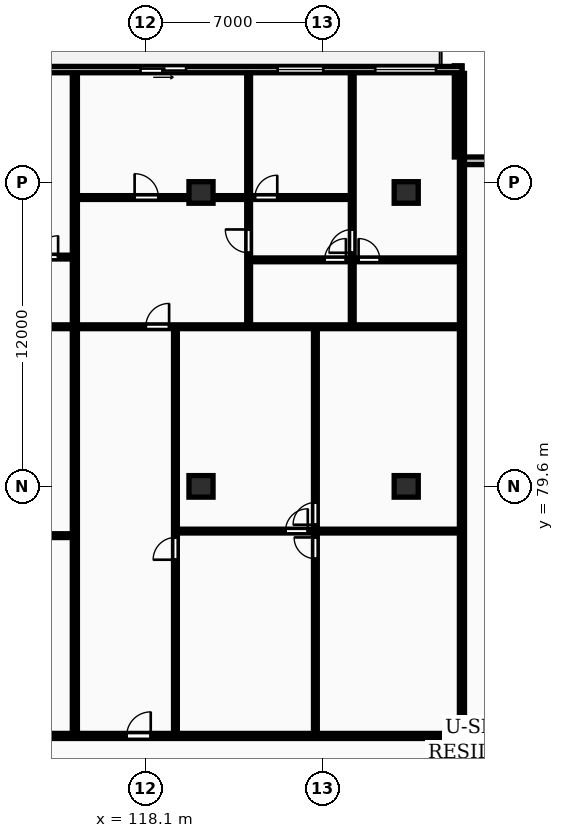
"""IFC4 building model, lengths in metres.
Left out: names, types, materials, properties, quantities, classifications, styles, units other than length and angle.
Written with IfcOpenShell. Run it as: python <this file> out.ifc"""

import sys

from ifc_helpers import new_model, si_unit, direction, frame, frame_2d, origin, origin_2d, place, context, subcontext, project, spatial, rectangle, extrude, element, fill, save


model = new_model("IFC4")
c1 = context("Model", 3, precision=1e-05, world=origin(), true_north=direction((0.0, 1.0)))
c2 = subcontext(c1, "Body", "Model", "MODEL_VIEW")
j1 = project(units=[si_unit("LENGTHUNIT", "METRE"), si_unit("PLANEANGLEUNIT", "RADIAN")], contexts=[c1])
p1 = place(None, origin())
s1 = spatial("IfcSite", under=j1, at=p1, CompositionType="ELEMENT")
p2 = place(p1, origin())
s2 = spatial("IfcBuilding", under=s1, at=p2, CompositionType="ELEMENT")
p3 = place(p2, frame((0.0, 0.0, 119.8)))
s3 = spatial("IfcBuildingStorey", under=s2, at=p3, CompositionType="ELEMENT", Elevation=119.8)
for number, where, z_axis, x_axis in (
    (1, (120.3, 79.6, 0.0), (0.0, 0.0, 1.0), (1.0, 0.0, 0.0)),
    (2, (120.3, 91.2, 0.0), (0.0, 0.0, 1.0), (1.0, 0.0, 0.0)),
    (3, (128.4, 79.6, 0.0), (0.0, 0.0, 1.0), (1.0, 0.0, 0.0)),
    (4, (128.4, 91.2, 0.0), (0.0, 0.0, 1.0), (1.0, 0.0, 0.0)),
):
    element("IfcColumn", number, at=place(p3, frame(where, z_axis=z_axis, x_axis=x_axis)), inside=s3, PredefinedType="COLUMN", context=c2, shape_type="SweptSolid", body=[
        extrude(rectangle(XDim=0.95, YDim=0.85, at=origin_2d()), origin(), (0.0, 0.0, 1.0), 3.25),
    ])
for number, where, z_axis, x_axis in (
    (5, (134.2, 92.45, 0.0), (0.0, 0.0, 1.0), (-1.0, 0.0, 0.0)),
    (6, (130.45, 92.6, 0.0), (0.0, 0.0, 1.0), (0.0, 1.0, 0.0)),
):
    element("IfcWall", number, at=place(p3, frame(where, z_axis=z_axis, x_axis=x_axis)), inside=s3, PredefinedType="STANDARD", context=c2, shape_type="SweptSolid", body=[
        extrude(rectangle(XDim=3.6, YDim=0.3, at=frame_2d((1.8, 0.0))), origin(), (0.0, 0.0, 1.0), 2.97),
    ])
p4 = place(p3, frame((130.6, 96.05, 0.0), z_axis=(0.0, 0.0, 1.0), x_axis=(-1.0, 0.0, 0.0)))
e7 = element("IfcWall", 7, at=p4, inside=s3, PredefinedType="STANDARD", context=c2, shape_type="SweptSolid", body=[
    extrude(rectangle(XDim=73.0, YDim=0.25, at=frame_2d((36.5, 0.0))), origin(), (0.0, 0.0, 1.0), 2.97),
])
p5 = place(p4, frame((67.772, 0.0, 0.0)))
e8 = element("IfcOpeningElement", 8, at=p5, cuts=e7, PredefinedType="OPENING", context=c2, shape_type="SweptSolid", body=[
    extrude(rectangle(XDim=1.8, YDim=2.2, at=frame_2d((0.9, 1.1))), frame((0.0, 0.135, 0.0), z_axis=(0.0, -1.0, 0.0), x_axis=(1.0, 0.0, 0.0)), (0.0, 0.0, 1.0), 0.27),
])
p6 = place(p4, frame((57.637, 0.0, 0.85)))
e9 = element("IfcOpeningElement", 9, at=p6, cuts=e7, PredefinedType="OPENING", context=c2, shape_type="SweptSolid", body=[
    extrude(rectangle(XDim=2.4, YDim=1.9, at=frame_2d((1.2, 0.95))), frame((0.0, 0.135, 0.0), z_axis=(0.0, -1.0, 0.0), x_axis=(1.0, 0.0, 0.0)), (0.0, 0.0, 1.0), 0.27),
])
p7 = place(p4, frame((47.827, 0.0, 0.0)))
e10 = element("IfcOpeningElement", 10, at=p7, cuts=e7, PredefinedType="OPENING", context=c2, shape_type="SweptSolid", body=[
    extrude(rectangle(XDim=1.8, YDim=2.2, at=frame_2d((0.9, 1.1))), frame((0.0, 0.135, 0.0), z_axis=(0.0, -1.0, 0.0), x_axis=(1.0, 0.0, 0.0)), (0.0, 0.0, 1.0), 0.27),
])
p8 = place(p4, frame((37.736, 0.0, 0.85)))
e11 = element("IfcOpeningElement", 11, at=p8, cuts=e7, PredefinedType="OPENING", context=c2, shape_type="SweptSolid", body=[
    extrude(rectangle(XDim=2.4, YDim=1.9, at=frame_2d((1.2, 0.95))), frame((0.0, 0.135, 0.0), z_axis=(0.0, -1.0, 0.0), x_axis=(1.0, 0.0, 0.0)), (0.0, 0.0, 1.0), 0.27),
])
p9 = place(p4, frame((21.9, 0.0, 0.85)))
e12 = element("IfcOpeningElement", 12, at=p9, cuts=e7, PredefinedType="OPENING", context=c2, shape_type="SweptSolid", body=[
    extrude(rectangle(XDim=2.4, YDim=1.9, at=frame_2d((1.2, 0.95))), frame((0.0, 0.135, 0.0), z_axis=(0.0, -1.0, 0.0), x_axis=(1.0, 0.0, 0.0)), (0.0, 0.0, 1.0), 0.27),
])
p10 = place(p4, frame((28.584, 0.0, 0.0)))
e13 = element("IfcOpeningElement", 13, at=p10, cuts=e7, PredefinedType="OPENING", context=c2, shape_type="SweptSolid", body=[
    extrude(rectangle(XDim=1.8, YDim=2.2, at=frame_2d((0.9, 1.1))), frame((0.0, 0.135, 0.0), z_axis=(0.0, -1.0, 0.0), x_axis=(1.0, 0.0, 0.0)), (0.0, 0.0, 1.0), 0.27),
])
p11 = place(p4, frame((16.689, 0.0, 0.85)))
e14 = element("IfcOpeningElement", 14, at=p11, cuts=e7, PredefinedType="OPENING", context=c2, shape_type="SweptSolid", body=[
    extrude(rectangle(XDim=2.4, YDim=1.9, at=frame_2d((1.2, 0.95))), frame((0.0, 0.135, 0.0), z_axis=(0.0, -1.0, 0.0), x_axis=(1.0, 0.0, 0.0)), (0.0, 0.0, 1.0), 0.27),
])
p12 = place(p4, frame((5.475, 0.0, 0.85)))
e15 = element("IfcOpeningElement", 15, at=p12, cuts=e7, PredefinedType="OPENING", context=c2, shape_type="SweptSolid", body=[
    extrude(rectangle(XDim=1.8, YDim=1.8, at=frame_2d((0.9, 0.9))), frame((0.0, 0.135, 0.0), z_axis=(0.0, -1.0, 0.0), x_axis=(1.0, 0.0, 0.0)), (0.0, 0.0, 1.0), 0.27),
])
p13 = place(p4, frame((10.889, 0.0, 0.0)))
e16 = element("IfcOpeningElement", 16, at=p13, cuts=e7, PredefinedType="OPENING", context=c2, shape_type="SweptSolid", body=[
    extrude(rectangle(XDim=1.8, YDim=2.2, at=frame_2d((0.9, 1.1))), frame((0.0, 0.135, 0.0), z_axis=(0.0, -1.0, 0.0), x_axis=(1.0, 0.0, 0.0)), (0.0, 0.0, 1.0), 0.27),
])
p14 = place(p4, frame((1.025, 0.0, 0.85)))
e17 = element("IfcOpeningElement", 17, at=p14, cuts=e7, PredefinedType="OPENING", context=c2, shape_type="SweptSolid", body=[
    extrude(rectangle(XDim=2.4, YDim=1.9, at=frame_2d((1.2, 0.95))), frame((0.0, 0.135, 0.0), z_axis=(0.0, -1.0, 0.0), x_axis=(1.0, 0.0, 0.0)), (0.0, 0.0, 1.0), 0.27),
])
for number, where, z_axis, x_axis in (
    (18, (130.6, 69.83, 0.0), (0.0, 0.0, 1.0), (0.0, 1.0, 0.0)),
    (19, (115.321, 69.83, 0.0), (0.0, 0.0, 1.0), (0.0, 1.0, 0.0)),
):
    element("IfcWall", number, at=place(p3, frame(where, z_axis=z_axis, x_axis=x_axis)), inside=s3, PredefinedType="PARTITIONING", context=c2, shape_type="SweptSolid", body=[
        extrude(rectangle(XDim=26.07, YDim=0.2, at=frame_2d((13.035, 0.0))), origin(), (0.0, 0.0, 1.0), 2.97),
    ])
p15 = place(p3, frame((101.362, 77.655, 0.0), z_axis=(0.0, 0.0, 1.0), x_axis=(1.0, 0.0, 0.0)))
e20 = element("IfcWall", 20, at=p15, inside=s3, PredefinedType="PARTITIONING", context=c2, shape_type="SweptSolid", body=[
    extrude(rectangle(XDim=13.88, YDim=0.15, at=frame_2d((6.94, 0.0))), origin(), (0.0, 0.0, 1.0), 2.97),
])
p16 = place(p15, frame((5.94, 0.0, 0.0)))
e21 = element("IfcOpeningElement", 21, at=p16, cuts=e20, PredefinedType="OPENING", context=c2, shape_type="SweptSolid", body=[
    extrude(rectangle(XDim=0.88, YDim=2.06, at=frame_2d((0.44, 1.03))), frame((0.0, 0.085, 0.0), z_axis=(0.0, -1.0, 0.0), x_axis=(1.0, 0.0, 0.0)), (0.0, 0.0, 1.0), 0.17),
])
p17 = place(p3, frame((104.82, 88.65, 0.0), z_axis=(0.0, 0.0, 1.0), x_axis=(1.0, 0.0, 0.0)))
e22 = element("IfcWall", 22, at=p17, inside=s3, PredefinedType="PARTITIONING", context=c2, shape_type="SweptSolid", body=[
    extrude(rectangle(XDim=10.421, YDim=0.15, at=frame_2d((5.21, 0.0))), origin(), (0.0, 0.0, 1.0), 2.97),
])
p18 = place(p17, frame((4.31, 0.0, 0.0)))
e23 = element("IfcOpeningElement", 23, at=p18, cuts=e22, PredefinedType="OPENING", context=c2, shape_type="SweptSolid", body=[
    extrude(rectangle(XDim=0.84, YDim=2.04, at=frame_2d((0.42, 1.02))), frame((0.0, 0.085, 0.0), z_axis=(0.0, -1.0, 0.0), x_axis=(1.0, 0.0, 0.0)), (0.0, 0.0, 1.0), 0.17),
])
p19 = place(p17, frame((9.0, 0.0, 0.0)))
e24 = element("IfcOpeningElement", 24, at=p19, cuts=e22, PredefinedType="OPENING", context=c2, shape_type="SweptSolid", body=[
    extrude(rectangle(XDim=0.84, YDim=2.04, at=frame_2d((0.42, 1.02))), frame((0.0, 0.085, 0.0), z_axis=(0.0, -1.0, 0.0), x_axis=(1.0, 0.0, 0.0)), (0.0, 0.0, 1.0), 0.17),
])
p20 = place(p3, frame((97.412, 85.9, 0.0), z_axis=(0.0, 0.0, 1.0), x_axis=(1.0, 0.0, 0.0)))
e25 = element("IfcWall", 25, at=p20, inside=s3, PredefinedType="PARTITIONING", context=c2, shape_type="SweptSolid", body=[
    extrude(rectangle(XDim=17.83, YDim=0.15, at=frame_2d((8.915, 0.0))), origin(), (0.0, 0.0, 1.0), 2.97),
])
p21 = place(p20, frame((2.72, 0.0, 0.0)))
e26 = element("IfcOpeningElement", 26, at=p21, cuts=e25, PredefinedType="OPENING", context=c2, shape_type="SweptSolid", body=[
    extrude(rectangle(XDim=0.92, YDim=2.08, at=frame_2d((0.46, 1.04))), frame((0.0, 0.085, 0.0), z_axis=(0.0, -1.0, 0.0), x_axis=(1.0, 0.0, 0.0)), (0.0, 0.0, 1.0), 0.17),
])
p22 = place(p3, frame((124.815, 69.81, 0.0), z_axis=(0.0, 0.0, 1.0), x_axis=(0.0, 1.0, 0.0)))
e27 = element("IfcWall", 27, at=p22, inside=s3, PredefinedType="PARTITIONING", context=c2, shape_type="SweptSolid", body=[
    extrude(rectangle(XDim=16.05, YDim=0.15, at=frame_2d((8.025, 0.0))), origin(), (0.0, 0.0, 1.0), 2.97),
])
p23 = place(p22, frame((6.935, 0.0, 0.0)))
e28 = element("IfcOpeningElement", 28, at=p23, cuts=e27, PredefinedType="OPENING", context=c2, shape_type="SweptSolid", body=[
    extrude(rectangle(XDim=0.84, YDim=2.04, at=frame_2d((0.42, 1.02))), frame((0.0, 0.085, 0.0), z_axis=(0.0, -1.0, 0.0), x_axis=(1.0, 0.0, 0.0)), (0.0, 0.0, 1.0), 0.17),
])
p24 = place(p22, frame((8.275, 0.0, 0.0)))
e29 = element("IfcOpeningElement", 29, at=p24, cuts=e27, PredefinedType="OPENING", context=c2, shape_type="SweptSolid", body=[
    extrude(rectangle(XDim=0.88, YDim=2.06, at=frame_2d((0.44, 1.03))), frame((0.0, 0.085, 0.0), z_axis=(0.0, -1.0, 0.0), x_axis=(1.0, 0.0, 0.0)), (0.0, 0.0, 1.0), 0.17),
])
p25 = place(p3, frame((119.351, 77.835, 0.0), z_axis=(0.0, 0.0, 1.0), x_axis=(1.0, 0.0, 0.0)))
e30 = element("IfcWall", 30, at=p25, inside=s3, PredefinedType="PARTITIONING", context=c2, shape_type="SweptSolid", body=[
    extrude(rectangle(XDim=11.169, YDim=0.15, at=frame_2d((5.584, 0.0))), origin(), (0.0, 0.0, 1.0), 2.97),
])
p26 = place(p25, frame((4.284, 0.0, 0.0)))
e31 = element("IfcOpeningElement", 31, at=p26, cuts=e30, PredefinedType="OPENING", context=c2, shape_type="SweptSolid", body=[
    extrude(rectangle(XDim=0.88, YDim=2.06, at=frame_2d((0.44, 1.03))), frame((0.0, 0.085, 0.0), z_axis=(0.0, -1.0, 0.0), x_axis=(1.0, 0.0, 0.0)), (0.0, 0.0, 1.0), 0.17),
])
p27 = place(p3, frame((119.291, 69.81, 0.0), z_axis=(0.0, 0.0, 1.0), x_axis=(0.0, 1.0, 0.0)))
e32 = element("IfcWall", 32, at=p27, inside=s3, PredefinedType="PARTITIONING", context=c2, shape_type="SweptSolid", body=[
    extrude(rectangle(XDim=16.05, YDim=0.15, at=frame_2d((8.025, 0.0))), origin(), (0.0, 0.0, 1.0), 2.97),
])
p28 = place(p27, frame((6.895, 0.0, 0.0)))
e33 = element("IfcOpeningElement", 33, at=p28, cuts=e32, PredefinedType="OPENING", context=c2, shape_type="SweptSolid", body=[
    extrude(rectangle(XDim=0.88, YDim=2.06, at=frame_2d((0.44, 1.03))), frame((0.0, 0.085, 0.0), z_axis=(0.0, -1.0, 0.0), x_axis=(1.0, 0.0, 0.0)), (0.0, 0.0, 1.0), 0.17),
])
p29 = place(p3, frame((122.18, 85.94, 0.0), z_axis=(0.0, 0.0, 1.0), x_axis=(0.0, 1.0, 0.0)))
e34 = element("IfcWall", 34, at=p29, inside=s3, PredefinedType="PARTITIONING", context=c2, shape_type="SweptSolid", body=[
    extrude(rectangle(XDim=9.96, YDim=0.15, at=frame_2d((4.98, 0.0))), origin(), (0.0, 0.0, 1.0), 2.97),
])
p30 = place(p29, frame((2.88, 0.0, 0.0)))
e35 = element("IfcOpeningElement", 35, at=p30, cuts=e34, PredefinedType="OPENING", context=c2, shape_type="SweptSolid", body=[
    extrude(rectangle(XDim=0.92, YDim=2.08, at=frame_2d((0.46, 1.04))), frame((0.0, 0.085, 0.0), z_axis=(0.0, -1.0, 0.0), x_axis=(1.0, 0.0, 0.0)), (0.0, 0.0, 1.0), 0.17),
])
p31 = place(p3, frame((126.27, 85.94, 0.0), z_axis=(0.0, 0.0, 1.0), x_axis=(0.0, 1.0, 0.0)))
e36 = element("IfcWall", 36, at=p31, inside=s3, PredefinedType="PARTITIONING", context=c2, shape_type="SweptSolid", body=[
    extrude(rectangle(XDim=2.58, YDim=0.15, at=frame_2d((1.29, 0.0))), origin(), (0.0, 0.0, 1.0), 2.97),
])
p32 = place(p3, frame((126.27, 88.56, 0.0), z_axis=(0.0, 0.0, 1.0), x_axis=(0.0, 1.0, 0.0)))
e37 = element("IfcWall", 37, at=p32, inside=s3, PredefinedType="PARTITIONING", context=c2, shape_type="SweptSolid", body=[
    extrude(rectangle(XDim=7.34, YDim=0.15, at=frame_2d((3.67, 0.0))), origin(), (0.0, 0.0, 1.0), 2.97),
])
p33 = place(p32, frame((0.26, 0.0, 0.0)))
e38 = element("IfcOpeningElement", 38, at=p33, cuts=e37, PredefinedType="OPENING", context=c2, shape_type="SweptSolid", body=[
    extrude(rectangle(XDim=0.92, YDim=2.08, at=frame_2d((0.46, 1.04))), frame((0.0, 0.085, 0.0), z_axis=(0.0, -1.0, 0.0), x_axis=(1.0, 0.0, 0.0)), (0.0, 0.0, 1.0), 0.17),
])
p34 = place(p3, frame((122.22, 88.54, 0.0), z_axis=(0.0, 0.0, 1.0), x_axis=(1.0, 0.0, 0.0)))
e39 = element("IfcWall", 39, at=p34, inside=s3, PredefinedType="PARTITIONING", context=c2, shape_type="SweptSolid", body=[
    extrude(rectangle(XDim=8.3, YDim=0.15, at=frame_2d((4.15, 0.0))), origin(), (0.0, 0.0, 1.0), 2.97),
])
p35 = place(p34, frame((2.96, 0.0, 0.0)))
e40 = element("IfcOpeningElement", 40, at=p35, cuts=e39, PredefinedType="OPENING", context=c2, shape_type="SweptSolid", body=[
    extrude(rectangle(XDim=0.84, YDim=2.04, at=frame_2d((0.42, 1.02))), frame((0.0, 0.085, 0.0), z_axis=(0.0, -1.0, 0.0), x_axis=(1.0, 0.0, 0.0)), (0.0, 0.0, 1.0), 0.17),
])
p36 = place(p34, frame((4.3, 0.0, 0.0)))
e41 = element("IfcOpeningElement", 41, at=p36, cuts=e39, PredefinedType="OPENING", context=c2, shape_type="SweptSolid", body=[
    extrude(rectangle(XDim=0.84, YDim=2.04, at=frame_2d((0.42, 1.02))), frame((0.0, 0.085, 0.0), z_axis=(0.0, -1.0, 0.0), x_axis=(1.0, 0.0, 0.0)), (0.0, 0.0, 1.0), 0.17),
])
p37 = place(p3, frame((115.401, 85.9, 0.0), z_axis=(0.0, 0.0, 1.0), x_axis=(1.0, 0.0, 0.0)))
e42 = element("IfcWall", 42, at=p37, inside=s3, PredefinedType="PARTITIONING", context=c2, shape_type="SweptSolid", body=[
    extrude(rectangle(XDim=15.119, YDim=0.15, at=frame_2d((7.56, 0.0))), origin(), (0.0, 0.0, 1.0), 2.97),
])
p38 = place(p37, frame((2.72, 0.0, 0.0)))
e43 = element("IfcOpeningElement", 43, at=p38, cuts=e42, PredefinedType="OPENING", context=c2, shape_type="SweptSolid", body=[
    extrude(rectangle(XDim=0.92, YDim=2.08, at=frame_2d((0.46, 1.04))), frame((0.0, 0.085, 0.0), z_axis=(0.0, -1.0, 0.0), x_axis=(1.0, 0.0, 0.0)), (0.0, 0.0, 1.0), 0.17),
])
p39 = place(p3, frame((115.401, 91.0, 0.0), z_axis=(0.0, 0.0, 1.0), x_axis=(1.0, 0.0, 0.0)))
e44 = element("IfcWall", 44, at=p39, inside=s3, PredefinedType="PARTITIONING", context=c2, shape_type="SweptSolid", body=[
    extrude(rectangle(XDim=10.869, YDim=0.15, at=frame_2d((5.435, 0.0))), origin(), (0.0, 0.0, 1.0), 2.663),
])
p40 = place(p39, frame((2.279, 0.0, 0.0)))
e45 = element("IfcOpeningElement", 45, at=p40, cuts=e44, PredefinedType="OPENING", context=c2, shape_type="SweptSolid", body=[
    extrude(rectangle(XDim=0.94, YDim=2.1, at=frame_2d((0.47, 1.05))), frame((0.0, 0.085, 0.0), z_axis=(0.0, -1.0, 0.0), x_axis=(1.0, 0.0, 0.0)), (0.0, 0.0, 1.0), 0.17),
])
p41 = place(p39, frame((7.029, 0.0, 0.0)))
e46 = element("IfcOpeningElement", 46, at=p41, cuts=e44, PredefinedType="OPENING", context=c2, shape_type="SweptSolid", body=[
    extrude(rectangle(XDim=0.88, YDim=2.06, at=frame_2d((0.44, 1.03))), frame((0.0, 0.085, 0.0), z_axis=(0.0, -1.0, 0.0), x_axis=(1.0, 0.0, 0.0)), (0.0, 0.0, 1.0), 0.17),
])
p42 = place(p3, frame((57.6, 69.75, 0.0), z_axis=(0.0, 0.0, 1.0), x_axis=(1.0, 0.0, 0.0)))
e47 = element("IfcWall", 47, at=p42, inside=s3, PredefinedType="PARTITIONING", context=c2, shape_type="SweptSolid", body=[
    extrude(rectangle(XDim=73.0, YDim=0.2, at=frame_2d((36.5, 0.0))), origin(), (0.0, 0.0, 1.0), 2.97),
])
p43 = place(p42, frame((7.364, 0.0, 0.0)))
e48 = element("IfcOpeningElement", 48, at=p43, cuts=e47, PredefinedType="OPENING", context=c2, shape_type="SweptSolid", body=[
    extrude(rectangle(XDim=1.22, YDim=2.18, at=frame_2d((0.61, 1.09))), frame((0.0, 0.11, 0.0), z_axis=(0.0, -1.0, 0.0), x_axis=(1.0, 0.0, 0.0)), (0.0, 0.0, 1.0), 0.22),
])
p44 = place(p42, frame((28.813, 0.0, 0.0)))
e49 = element("IfcOpeningElement", 49, at=p44, cuts=e47, PredefinedType="OPENING", context=c2, shape_type="SweptSolid", body=[
    extrude(rectangle(XDim=1.22, YDim=2.18, at=frame_2d((0.61, 1.09))), frame((0.0, 0.11, 0.0), z_axis=(0.0, -1.0, 0.0), x_axis=(1.0, 0.0, 0.0)), (0.0, 0.0, 1.0), 0.22),
])
p45 = place(p42, frame((41.777, 0.0, 0.0)))
e50 = element("IfcOpeningElement", 50, at=p45, cuts=e47, PredefinedType="OPENING", context=c2, shape_type="SweptSolid", body=[
    extrude(rectangle(XDim=0.95, YDim=2.15, at=frame_2d((0.475, 1.075))), frame((0.0, 0.11, 0.0), z_axis=(0.0, -1.0, 0.0), x_axis=(1.0, 0.0, 0.0)), (0.0, 0.0, 1.0), 0.22),
])
p46 = place(p42, frame((59.766, 0.0, 0.0)))
e51 = element("IfcOpeningElement", 51, at=p46, cuts=e47, PredefinedType="OPENING", context=c2, shape_type="SweptSolid", body=[
    extrude(rectangle(XDim=0.95, YDim=2.15, at=frame_2d((0.475, 1.075))), frame((0.0, 0.11, 0.0), z_axis=(0.0, -1.0, 0.0), x_axis=(1.0, 0.0, 0.0)), (0.0, 0.0, 1.0), 0.22),
])
p47 = place(p12, origin())
e52 = element("IfcWindow", 52, at=p47, inside=s3, PartitioningType="SINGLE_PANEL", PredefinedType="WINDOW", context=c2, shape_type="SweptSolid", body=[
    extrude(rectangle(XDim=1.8, YDim=1.8, at=frame_2d((0.9, 0.9))), frame((0.0, 0.03, 0.0), z_axis=(0.0, -1.0, 0.0), x_axis=(1.0, 0.0, 0.0)), (0.0, 0.0, 1.0), 0.06),
])
fill(e15, e52)
p48 = place(p13, origin())
e53 = element("IfcDoor", 53, at=p48, inside=s3, OperationType="SLIDING_TO_LEFT", PredefinedType="DOOR", context=c2, shape_type="SweptSolid", body=[
    extrude(rectangle(XDim=1.8, YDim=2.2, at=frame_2d((0.9, 1.1))), frame((0.0, 0.025, 0.0), z_axis=(0.0, -1.0, 0.0), x_axis=(1.0, 0.0, 0.0)), (0.0, 0.0, 1.0), 0.05),
])
fill(e16, e53)
p49 = place(p14, origin())
e54 = element("IfcWindow", 54, at=p49, inside=s3, PartitioningType="DOUBLE_PANEL_VERTICAL", PredefinedType="WINDOW", context=c2, shape_type="SweptSolid", body=[
    extrude(rectangle(XDim=2.4, YDim=1.9, at=frame_2d((1.2, 0.95))), frame((0.0, 0.03, 0.0), z_axis=(0.0, -1.0, 0.0), x_axis=(1.0, 0.0, 0.0)), (0.0, 0.0, 1.0), 0.06),
])
fill(e17, e54)
p50 = place(p19, origin())
e55 = element("IfcDoor", 55, at=p50, inside=s3, OperationType="SINGLE_SWING_RIGHT", PredefinedType="DOOR", context=c2, shape_type="SweptSolid", body=[
    extrude(rectangle(XDim=0.84, YDim=2.04, at=frame_2d((0.42, 1.02))), frame((0.0, 0.025, 0.0), z_axis=(0.0, -1.0, 0.0), x_axis=(1.0, 0.0, 0.0)), (0.0, 0.0, 1.0), 0.05),
])
fill(e24, e55)
p51 = place(p23, origin())
e56 = element("IfcDoor", 56, at=p51, inside=s3, OperationType="SINGLE_SWING_RIGHT", PredefinedType="DOOR", context=c2, shape_type="SweptSolid", body=[
    extrude(rectangle(XDim=0.84, YDim=2.04, at=frame_2d((0.42, 1.02))), frame((0.0, 0.025, 0.0), z_axis=(0.0, -1.0, 0.0), x_axis=(1.0, 0.0, 0.0)), (0.0, 0.0, 1.0), 0.05),
])
fill(e28, e56)
p52 = place(p24, origin())
e57 = element("IfcDoor", 57, at=p52, inside=s3, OperationType="SINGLE_SWING_LEFT", PredefinedType="DOOR", context=c2, shape_type="SweptSolid", body=[
    extrude(rectangle(XDim=0.88, YDim=2.06, at=frame_2d((0.44, 1.03))), frame((0.0, 0.025, 0.0), z_axis=(0.0, -1.0, 0.0), x_axis=(1.0, 0.0, 0.0)), (0.0, 0.0, 1.0), 0.05),
])
fill(e29, e57)
p53 = place(p26, origin())
e58 = element("IfcDoor", 58, at=p53, inside=s3, OperationType="SINGLE_SWING_RIGHT", PredefinedType="DOOR", context=c2, shape_type="SweptSolid", body=[
    extrude(rectangle(XDim=0.88, YDim=2.06, at=frame_2d((0.44, 1.03))), frame((0.0, 0.025, 0.0), z_axis=(0.0, -1.0, 0.0), x_axis=(1.0, 0.0, 0.0)), (0.0, 0.0, 1.0), 0.05),
])
fill(e31, e58)
p54 = place(p28, origin())
e59 = element("IfcDoor", 59, at=p54, inside=s3, OperationType="SINGLE_SWING_LEFT", PredefinedType="DOOR", context=c2, shape_type="SweptSolid", body=[
    extrude(rectangle(XDim=0.88, YDim=2.06, at=frame_2d((0.44, 1.03))), frame((0.0, 0.025, 0.0), z_axis=(0.0, -1.0, 0.0), x_axis=(1.0, 0.0, 0.0)), (0.0, 0.0, 1.0), 0.05),
])
fill(e33, e59)
p55 = place(p30, origin())
e60 = element("IfcDoor", 60, at=p55, inside=s3, OperationType="SINGLE_SWING_RIGHT", PredefinedType="DOOR", context=c2, shape_type="SweptSolid", body=[
    extrude(rectangle(XDim=0.92, YDim=2.08, at=frame_2d((0.46, 1.04))), frame((0.0, 0.025, 0.0), z_axis=(0.0, -1.0, 0.0), x_axis=(1.0, 0.0, 0.0)), (0.0, 0.0, 1.0), 0.05),
])
fill(e35, e60)
p56 = place(p33, origin())
e61 = element("IfcDoor", 61, at=p56, inside=s3, OperationType="SINGLE_SWING_LEFT", PredefinedType="DOOR", context=c2, shape_type="SweptSolid", body=[
    extrude(rectangle(XDim=0.92, YDim=2.08, at=frame_2d((0.46, 1.04))), frame((0.0, 0.025, 0.0), z_axis=(0.0, -1.0, 0.0), x_axis=(1.0, 0.0, 0.0)), (0.0, 0.0, 1.0), 0.05),
])
fill(e38, e61)
p57 = place(p35, origin())
e62 = element("IfcDoor", 62, at=p57, inside=s3, OperationType="SINGLE_SWING_RIGHT", PredefinedType="DOOR", context=c2, shape_type="SweptSolid", body=[
    extrude(rectangle(XDim=0.84, YDim=2.04, at=frame_2d((0.42, 1.02))), frame((0.0, 0.025, 0.0), z_axis=(0.0, -1.0, 0.0), x_axis=(1.0, 0.0, 0.0)), (0.0, 0.0, 1.0), 0.05),
])
fill(e40, e62)
p58 = place(p36, origin())
e63 = element("IfcDoor", 63, at=p58, inside=s3, OperationType="SINGLE_SWING_LEFT", PredefinedType="DOOR", context=c2, shape_type="SweptSolid", body=[
    extrude(rectangle(XDim=0.84, YDim=2.04, at=frame_2d((0.42, 1.02))), frame((0.0, 0.025, 0.0), z_axis=(0.0, -1.0, 0.0), x_axis=(1.0, 0.0, 0.0)), (0.0, 0.0, 1.0), 0.05),
])
fill(e41, e63)
p59 = place(p38, origin())
e64 = element("IfcDoor", 64, at=p59, inside=s3, OperationType="SINGLE_SWING_RIGHT", PredefinedType="DOOR", context=c2, shape_type="SweptSolid", body=[
    extrude(rectangle(XDim=0.92, YDim=2.08, at=frame_2d((0.46, 1.04))), frame((0.0, 0.025, 0.0), z_axis=(0.0, -1.0, 0.0), x_axis=(1.0, 0.0, 0.0)), (0.0, 0.0, 1.0), 0.05),
])
fill(e43, e64)
p60 = place(p40, origin())
e65 = element("IfcDoor", 65, at=p60, inside=s3, OperationType="SINGLE_SWING_LEFT", PredefinedType="DOOR", context=c2, shape_type="SweptSolid", body=[
    extrude(rectangle(XDim=0.94, YDim=2.1, at=frame_2d((0.47, 1.05))), frame((0.0, 0.025, 0.0), z_axis=(0.0, -1.0, 0.0), x_axis=(1.0, 0.0, 0.0)), (0.0, 0.0, 1.0), 0.05),
])
fill(e45, e65)
p61 = place(p41, origin())
e66 = element("IfcDoor", 66, at=p61, inside=s3, OperationType="SINGLE_SWING_RIGHT", PredefinedType="DOOR", context=c2, shape_type="SweptSolid", body=[
    extrude(rectangle(XDim=0.88, YDim=2.06, at=frame_2d((0.44, 1.03))), frame((0.0, 0.025, 0.0), z_axis=(0.0, -1.0, 0.0), x_axis=(1.0, 0.0, 0.0)), (0.0, 0.0, 1.0), 0.05),
])
fill(e46, e66)
p62 = place(p46, origin())
e67 = element("IfcDoor", 67, at=p62, inside=s3, OperationType="SINGLE_SWING_RIGHT", PredefinedType="DOOR", context=c2, shape_type="SweptSolid", body=[
    extrude(rectangle(XDim=0.95, YDim=2.15, at=frame_2d((0.475, 1.075))), frame((0.0, 0.025, 0.0), z_axis=(0.0, -1.0, 0.0), x_axis=(1.0, 0.0, 0.0)), (0.0, 0.0, 1.0), 0.05),
])
fill(e51, e67)
save(model, sys.argv[1])
